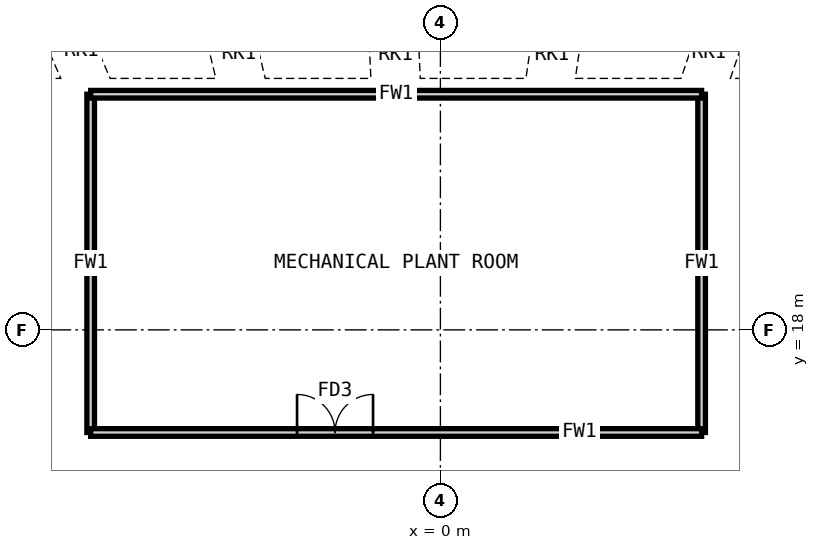
"""IFC4 building model, lengths in metres.
Left out: names, types, materials, properties, quantities, classifications, styles, units other than length and angle.
Written with IfcOpenShell. Run it as: python <this file> out.ifc"""

import sys

from ifc_helpers import new_model, si_unit, direction, frame, frame_2d, origin, origin_2d, place, context, subcontext, project, spatial, rectangle, hollow_rectangle, extrude, clip, halfspace, element, fill, save


model = new_model("IFC4")
c1 = context("Model", 3, precision=1e-05, world=origin(), true_north=direction((0.0, 1.0)))
c2 = subcontext(c1, "Body", "Model", "MODEL_VIEW")
j1 = project(units=[si_unit("LENGTHUNIT", "METRE"), si_unit("PLANEANGLEUNIT", "RADIAN")], contexts=[c1])
p1 = place(None, origin())
s1 = spatial("IfcSite", under=j1, at=p1, CompositionType="ELEMENT")
p2 = place(p1, origin())
s2 = spatial("IfcBuilding", under=s1, at=p2, CompositionType="ELEMENT")
p3 = place(p2, frame((0.0, 0.0, 97.0)))
s3 = spatial("IfcBuildingStorey", under=s2, at=p3, CompositionType="ELEMENT", Elevation=97.0)
p4 = place(p3, frame((-10.067, 27.0, 0.0), z_axis=(0.13539287358, -0.313315937958, 0.939947813873), x_axis=(-0.917958510973, -0.39667640733, 0.0)))
e1 = element("IfcColumn", 1, at=p4, inside=s3, PredefinedType="COLUMN", context=c2, shape_type="Clipping", body=[
    clip(clip(extrude(hollow_rectangle(XDim=1.3, YDim=1.3, WallThickness=0.1, at=origin_2d()), origin(), (0.0, 0.0, 1.0), 6.383), halfspace(frame((0.0, 0.0, 0.236), z_axis=(0.0, 0.0, -1.0), x_axis=(0.0, -1.0, 0.0)), False)), halfspace(frame((0.0, 0.0, 6.148), z_axis=(0.0, 0.0, 1.0), x_axis=(0.0, 1.0, 0.0)), False)),
])
p5 = place(p3, frame((-5.662, 27.0, 0.0), z_axis=(0.075482606541, -0.315325605701, 0.945976817104), x_axis=(-0.972523990796, -0.232802678949, 0.0)))
e2 = element("IfcColumn", 2, at=p5, inside=s3, PredefinedType="COLUMN", context=c2, shape_type="Clipping", body=[
    clip(clip(extrude(hollow_rectangle(XDim=1.3, YDim=1.3, WallThickness=0.1, at=origin_2d()), origin(), (0.0, 0.0, 1.0), 6.343), halfspace(frame((0.0, 0.0, 0.222), z_axis=(0.0, 0.0, -1.0), x_axis=(0.0, -1.0, 0.0)), False)), halfspace(frame((0.0, 0.0, 6.12), z_axis=(0.0, 0.0, 1.0), x_axis=(0.0, 1.0, 0.0)), False)),
])
p6 = place(p3, frame((-1.258, 27.0, 0.0), z_axis=(0.014705780072, -0.316193570465, 0.948580711394), x_axis=(-0.998920217686, -0.046458569695, 0.0)))
e3 = element("IfcColumn", 3, at=p6, inside=s3, PredefinedType="COLUMN", context=c2, shape_type="Clipping", body=[
    clip(clip(extrude(hollow_rectangle(XDim=1.3, YDim=1.3, WallThickness=0.1, at=origin_2d()), origin(), (0.0, 0.0, 1.0), 6.325), halfspace(frame((0.0, 0.0, 0.215), z_axis=(0.0, 0.0, -1.0), x_axis=(0.0, -1.0, 0.0)), False)), halfspace(frame((0.0, 0.0, 6.111), z_axis=(0.0, 0.0, 1.0), x_axis=(0.0, 1.0, 0.0)), False)),
])
p7 = place(p3, frame((3.147, 27.0, 0.0), z_axis=(-0.046195851301, -0.315890161816, 0.947670485449), x_axis=(-0.989475410036, 0.144701115872, 0.0)))
e4 = element("IfcColumn", 4, at=p7, inside=s3, PredefinedType="COLUMN", context=c2, shape_type="Clipping", body=[
    clip(clip(extrude(hollow_rectangle(XDim=1.3, YDim=1.3, WallThickness=0.1, at=origin_2d()), origin(), (0.0, 0.0, 1.0), 6.331), halfspace(frame((0.0, 0.0, 0.219), z_axis=(0.0, 0.0, -1.0), x_axis=(0.0, -1.0, 0.0)), False)), halfspace(frame((0.0, 0.0, 6.113), z_axis=(0.0, 0.0, 1.0), x_axis=(0.0, 1.0, 0.0)), False)),
])
p8 = place(p3, frame((7.552, 27.0, 0.0), z_axis=(-0.106549202468, -0.314427617657, 0.94328285297), x_axis=(-0.947099238441, 0.320940855214, 0.0)))
e5 = element("IfcColumn", 5, at=p8, inside=s3, PredefinedType="COLUMN", context=c2, shape_type="Clipping", body=[
    clip(clip(extrude(hollow_rectangle(XDim=1.3, YDim=1.3, WallThickness=0.1, at=origin_2d()), origin(), (0.0, 0.0, 1.0), 6.361), halfspace(frame((0.0, 0.0, 0.229), z_axis=(0.0, 0.0, -1.0), x_axis=(0.0, -1.0, 0.0)), False)), halfspace(frame((0.0, 0.0, 6.132), z_axis=(0.0, 0.0, 1.0), x_axis=(0.0, 1.0, 0.0)), False)),
])
for number, where, z_axis, x_axis in (
    (6, (-9.203, 24.2, 0.0), (0.0, 0.0, 1.0), (0.0, -1.0, 0.0)),
    (7, (6.874, 24.2, 0.0), (0.0, 0.0, 1.0), (0.0, -1.0, 0.0)),
):
    element("IfcWall", number, at=place(p3, frame(where, z_axis=z_axis, x_axis=x_axis)), inside=s3, PredefinedType="PARTITIONING", context=c2, shape_type="SweptSolid", body=[
        extrude(rectangle(XDim=8.9, YDim=0.2, at=frame_2d((4.45, 0.0))), origin(), (0.0, 0.0, 1.0), 5.83),
    ])
p9 = place(p3, frame((-9.203, 15.3, 0.0), z_axis=(0.0, 0.0, 1.0), x_axis=(1.0, 0.0, 0.0)))
e8 = element("IfcWall", 8, at=p9, inside=s3, PredefinedType="PARTITIONING", context=c2, shape_type="SweptSolid", body=[
    extrude(rectangle(XDim=16.076, YDim=0.2, at=frame_2d((8.038, 0.0))), origin(), (0.0, 0.0, 1.0), 5.83),
])
p10 = place(p9, frame((5.43, 0.0, 0.0)))
e9 = element("IfcOpeningElement", 9, at=p10, cuts=e8, PredefinedType="OPENING", context=c2, shape_type="SweptSolid", body=[
    extrude(rectangle(XDim=2.0, YDim=2.4, at=frame_2d((1.0, 1.2))), frame((0.0, 0.11, 0.0), z_axis=(0.0, -1.0, 0.0), x_axis=(1.0, 0.0, 0.0)), (0.0, 0.0, 1.0), 0.22),
])
p11 = place(p3, frame((-9.203, 24.2, 0.0), z_axis=(0.0, 0.0, 1.0), x_axis=(1.0, 0.0, 0.0)))
e10 = element("IfcWall", 10, at=p11, inside=s3, PredefinedType="PARTITIONING", context=c2, shape_type="SweptSolid", body=[
    extrude(rectangle(XDim=16.076, YDim=0.2, at=frame_2d((8.038, 0.0))), origin(), (0.0, 0.0, 1.0), 5.83),
])
p12 = place(p10, origin())
e11 = element("IfcDoor", 11, at=p12, inside=s3, OperationType="DOUBLE_DOOR_DOUBLE_SWING", PredefinedType="DOOR", context=c2, shape_type="SweptSolid", body=[
    extrude(rectangle(XDim=2.0, YDim=2.4, at=frame_2d((1.0, 1.2))), frame((0.0, 0.025, 0.0), z_axis=(0.0, -1.0, 0.0), x_axis=(1.0, 0.0, 0.0)), (0.0, 0.0, 1.0), 0.05),
])
fill(e9, e11)
save(model, sys.argv[1])
